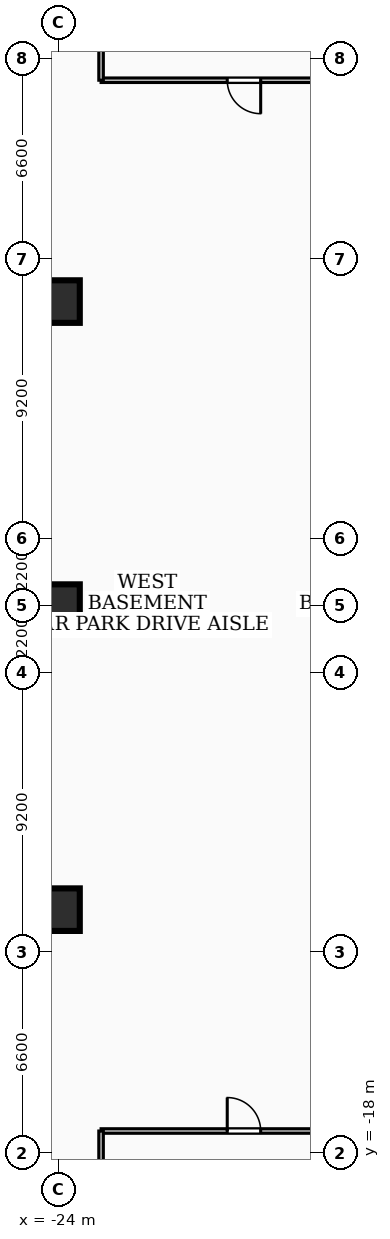
"""IFC4 building model, lengths in metres.
Left out: names, types, materials, properties, quantities, classifications, styles, units other than length and angle.
Written with IfcOpenShell. Run it as: python <this file> out.ifc"""

import sys

from ifc_helpers import new_model, si_unit, direction, frame, frame_2d, origin, origin_2d, place, context, subcontext, project, spatial, rectangle, extrude, element, fill, save


model = new_model("IFC4")
c1 = context("Model", 3, precision=1e-05, world=origin(), true_north=direction((0.0, 1.0)))
c2 = subcontext(c1, "Body", "Model", "MODEL_VIEW")
j1 = project(units=[si_unit("LENGTHUNIT", "METRE"), si_unit("PLANEANGLEUNIT", "RADIAN")], contexts=[c1])
p1 = place(None, origin())
s1 = spatial("IfcSite", under=j1, at=p1, CompositionType="ELEMENT")
p2 = place(p1, origin())
s2 = spatial("IfcBuilding", under=s1, at=p2, CompositionType="ELEMENT")
p3 = place(p2, frame((0.0, 0.0, -4.5)))
s3 = spatial("IfcBuildingStorey", under=s2, at=p3, CompositionType="ELEMENT", Elevation=-4.5)
for number, where, z_axis, x_axis in (
    (1, (-24.0, -10.0, 0.0), (0.0, 0.0, 1.0), (1.0, 0.0, 0.0)),
    (2, (-24.0, 0.0, 0.0), (0.0, 0.0, 1.0), (1.0, 0.0, 0.0)),
    (3, (-24.0, 10.0, 0.0), (0.0, 0.0, 1.0), (1.0, 0.0, 0.0)),
):
    element("IfcColumn", number, at=place(p3, frame(where, z_axis=z_axis, x_axis=x_axis)), inside=s3, PredefinedType="COLUMN", context=c2, shape_type="SweptSolid", body=[
        extrude(rectangle(XDim=1.4, YDim=1.4, at=origin_2d()), origin(), (0.0, 0.0, 1.0), 4.5),
    ])
p4 = place(p3, frame((-22.6, -17.28, 0.0), z_axis=(0.0, 0.0, 1.0), x_axis=(1.0, 0.0, 0.0)))
e4 = element("IfcWall", 4, at=p4, inside=s3, PredefinedType="PARTITIONING", context=c2, shape_type="SweptSolid", body=[
    extrude(rectangle(XDim=9.4, YDim=0.15, at=frame_2d((4.7, 0.0))), origin(), (0.0, 0.0, 1.0), 4.18),
])
p5 = place(p4, frame((4.15, 0.0, 0.0)))
e5 = element("IfcOpeningElement", 5, at=p5, cuts=e4, PredefinedType="OPENING", context=c2, shape_type="SweptSolid", body=[
    extrude(rectangle(XDim=1.1, YDim=2.15, at=frame_2d((0.55, 1.075))), frame((0.0, 0.085, 0.0), z_axis=(0.0, -1.0, 0.0), x_axis=(1.0, 0.0, 0.0)), (0.0, 0.0, 1.0), 0.17),
])
p6 = place(p3, frame((-22.6, -25.8, 0.0), z_axis=(0.0, 0.0, 1.0), x_axis=(0.0, 1.0, 0.0)))
e6 = element("IfcWall", 6, at=p6, inside=s3, PredefinedType="PARTITIONING", context=c2, shape_type="SweptSolid", body=[
    extrude(rectangle(XDim=8.52, YDim=0.15, at=frame_2d((4.26, 0.0))), origin(), (0.0, 0.0, 1.0), 4.18),
])
p7 = place(p3, frame((-13.2, 17.28, 0.0), z_axis=(0.0, 0.0, 1.0), x_axis=(-1.0, 0.0, 0.0)))
e7 = element("IfcWall", 7, at=p7, inside=s3, PredefinedType="PARTITIONING", context=c2, shape_type="SweptSolid", body=[
    extrude(rectangle(XDim=9.4, YDim=0.15, at=frame_2d((4.7, 0.0))), origin(), (0.0, 0.0, 1.0), 4.18),
])
p8 = place(p7, frame((4.15, 0.0, 0.0)))
e8 = element("IfcOpeningElement", 8, at=p8, cuts=e7, PredefinedType="OPENING", context=c2, shape_type="SweptSolid", body=[
    extrude(rectangle(XDim=1.1, YDim=2.15, at=frame_2d((0.55, 1.075))), frame((0.0, 0.085, 0.0), z_axis=(0.0, -1.0, 0.0), x_axis=(1.0, 0.0, 0.0)), (0.0, 0.0, 1.0), 0.17),
])
p9 = place(p3, frame((-22.6, 17.28, 0.0), z_axis=(0.0, 0.0, 1.0), x_axis=(0.0, 1.0, 0.0)))
e9 = element("IfcWall", 9, at=p9, inside=s3, PredefinedType="PARTITIONING", context=c2, shape_type="SweptSolid", body=[
    extrude(rectangle(XDim=8.52, YDim=0.15, at=frame_2d((4.26, 0.0))), origin(), (0.0, 0.0, 1.0), 3.072),
])
p10 = place(p5, origin())
e10 = element("IfcDoor", 10, at=p10, inside=s3, OperationType="SINGLE_SWING_LEFT", PredefinedType="DOOR", context=c2, shape_type="SweptSolid", body=[
    extrude(rectangle(XDim=1.1, YDim=2.15, at=frame_2d((0.55, 1.075))), frame((0.0, 0.025, 0.0), z_axis=(0.0, -1.0, 0.0), x_axis=(1.0, 0.0, 0.0)), (0.0, 0.0, 1.0), 0.05),
])
fill(e5, e10)
p11 = place(p8, origin())
e11 = element("IfcDoor", 11, at=p11, inside=s3, OperationType="SINGLE_SWING_LEFT", PredefinedType="DOOR", context=c2, shape_type="SweptSolid", body=[
    extrude(rectangle(XDim=1.1, YDim=2.15, at=frame_2d((0.55, 1.075))), frame((0.0, 0.025, 0.0), z_axis=(0.0, -1.0, 0.0), x_axis=(1.0, 0.0, 0.0)), (0.0, 0.0, 1.0), 0.05),
])
fill(e8, e11)
save(model, sys.argv[1])
